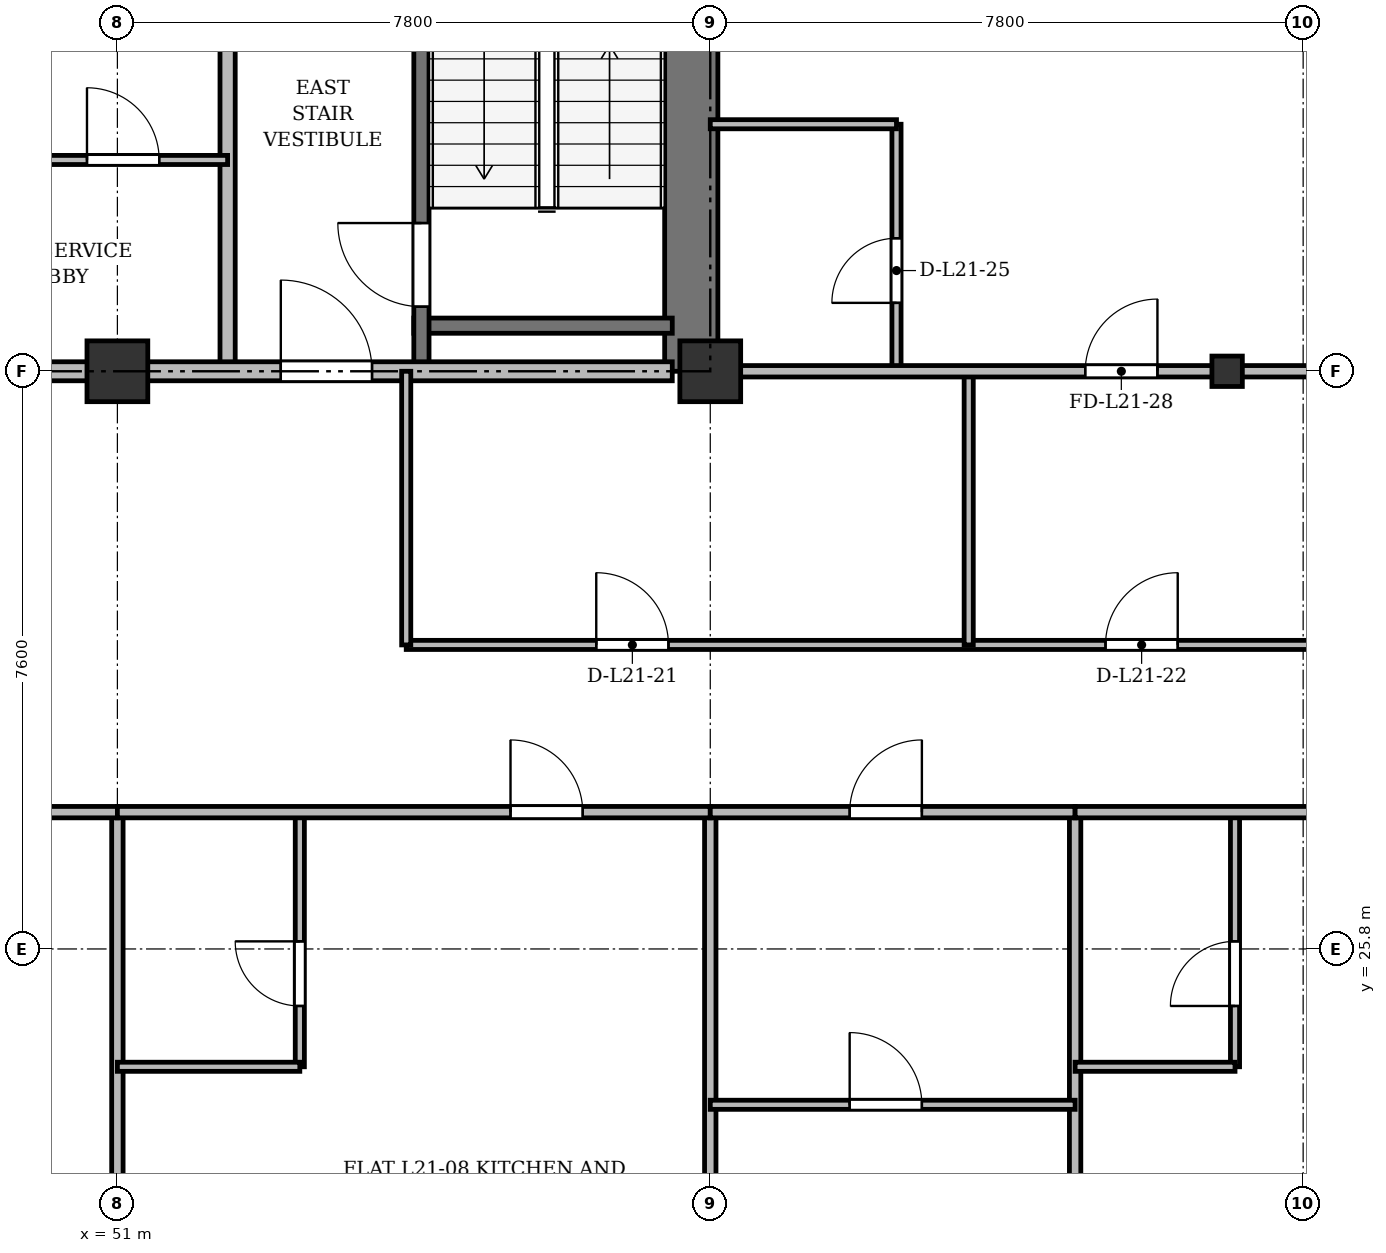
"""IFC4 building model, lengths in metres.
Left out: names, types, materials, properties, quantities, classifications, styles, units other than length and angle.
Written with IfcOpenShell. Run it as: python <this file> out.ifc"""

import sys

from ifc_helpers import new_model, si_unit, direction, frame, frame_2d, origin, origin_2d, place, context, subcontext, project, spatial, rectangle, i_section, extrude, source, transform, mapped, element, fill, save


model = new_model("IFC4")
c1 = context("Model", 3, precision=1e-05, world=origin(), true_north=direction((0.0, 1.0)))
c2 = subcontext(c1, "Body", "Model", "MODEL_VIEW")
j1 = project(units=[si_unit("LENGTHUNIT", "METRE"), si_unit("PLANEANGLEUNIT", "RADIAN")], contexts=[c1])
p1 = place(None, origin())
s1 = spatial("IfcSite", under=j1, at=p1, CompositionType="ELEMENT")
p2 = place(p1, origin())
s2 = spatial("IfcBuilding", under=s1, at=p2, CompositionType="ELEMENT")
p3 = place(p2, frame((0.0, 0.0, 85.3)))
s3 = spatial("IfcBuildingStorey", under=s2, at=p3, CompositionType="ELEMENT", Elevation=85.3)
m1 = source(origin(), c2, "Body", "SweptSolid", [
    extrude(rectangle(XDim=0.8, YDim=0.8, at=origin_2d()), origin(), (0.0, 0.0, 1.0), 3.6),
])
for number, where, z_axis, x_axis in (
    (1, (51.0, 33.4, 0.0), (0.0, 0.0, 1.0), (1.0, 0.0, 0.0)),
    (2, (58.8, 33.4, 0.0), (0.0, 0.0, 1.0), (1.0, 0.0, 0.0)),
):
    element("IfcColumn", number, at=place(p3, frame(where, z_axis=z_axis, x_axis=x_axis)), inside=s3, PredefinedType="COLUMN", context=c2, shape_type="MappedRepresentation", body=[
        mapped(m1, transform((0.0, 0.0, 0.0), x_axis=(1.0, 0.0, 0.0), y_axis=(0.0, 1.0, 0.0), z_axis=(0.0, 0.0, 1.0), scale=1.0)),
    ])
m2 = source(origin(), c2, "Body", "SweptSolid", [
    extrude(i_section(OverallWidth=0.4, OverallDepth=0.4, WebThickness=0.022, FlangeThickness=0.035, at=origin_2d()), origin(), (0.0, 0.0, 1.0), 3.6),
])
p4 = place(p3, frame((65.6, 33.4, 0.0), z_axis=(0.0, 0.0, 1.0), x_axis=(1.0, 0.0, 0.0)))
e3 = element("IfcColumn", 3, at=p4, inside=s3, PredefinedType="COLUMN", context=c2, shape_type="MappedRepresentation", body=[
    mapped(m2, transform((0.0, 0.0, 0.0), x_axis=(1.0, 0.0, 0.0), y_axis=(0.0, 1.0, 0.0), z_axis=(0.0, 0.0, 1.0), scale=1.0)),
])
p5 = place(p3, frame((58.55, 33.4, 0.0), z_axis=(0.0, 0.0, 1.0), x_axis=(0.0, 1.0, 0.0)))
e4 = element("IfcWall", 4, at=p5, inside=s3, PredefinedType="SHEAR", context=c2, shape_type="SweptSolid", body=[
    extrude(rectangle(XDim=11.7, YDim=0.7, at=frame_2d((5.85, 0.0))), origin(), (0.0, 0.0, 1.0), 3.34),
])
p6 = place(p3, frame((54.9, 34.0, 0.0), z_axis=(0.0, 0.0, 1.0), x_axis=(1.0, 0.0, 0.0)))
e5 = element("IfcWall", 5, at=p6, inside=s3, PredefinedType="SHEAR", context=c2, shape_type="SweptSolid", body=[
    extrude(rectangle(XDim=3.4, YDim=0.2, at=frame_2d((1.7, 0.0))), origin(), (0.0, 0.0, 1.0), 3.34),
])
p7 = place(p3, frame((55.0, 33.4, 0.0), z_axis=(0.0, 0.0, 1.0), x_axis=(0.0, 1.0, 0.0)))
e6 = element("IfcWall", 6, at=p7, inside=s3, PredefinedType="SHEAR", context=c2, shape_type="SweptSolid", body=[
    extrude(rectangle(XDim=11.1, YDim=0.2, at=frame_2d((5.55, 0.0))), origin(), (0.0, 0.0, 1.0), 3.34),
])
p8 = place(p7, frame((0.85, 0.0, 0.0)))
e7 = element("IfcOpeningElement", 7, at=p8, cuts=e6, PredefinedType="OPENING", context=c2, shape_type="SweptSolid", body=[
    extrude(rectangle(XDim=1.1, YDim=2.15, at=frame_2d((0.55, 1.075))), frame((0.0, 0.11, 0.0), z_axis=(0.0, -1.0, 0.0), x_axis=(1.0, 0.0, 0.0)), (0.0, 0.0, 1.0), 0.22),
])
p9 = place(p3, frame((52.45, 33.4, 0.0), z_axis=(0.0, 0.0, 1.0), x_axis=(0.0, 1.0, 0.0)))
e8 = element("IfcWall", 8, at=p9, inside=s3, PredefinedType="PARTITIONING", context=c2, shape_type="SweptSolid", body=[
    extrude(rectangle(XDim=8.65, YDim=0.2, at=frame_2d((4.325, 0.0))), origin(), (0.0, 0.0, 1.0), 2.752),
])
p10 = place(p9, frame((6.2, 0.0, 0.0)))
e9 = element("IfcOpeningElement", 9, at=p10, cuts=e8, PredefinedType="OPENING", context=c2, shape_type="SweptSolid", body=[
    extrude(rectangle(XDim=0.95, YDim=2.15, at=frame_2d((0.475, 1.075))), frame((0.0, 0.11, 0.0), z_axis=(0.0, -1.0, 0.0), x_axis=(1.0, 0.0, 0.0)), (0.0, 0.0, 1.0), 0.22),
])
p11 = place(p3, frame((47.15, 36.18, 0.0), z_axis=(0.0, 0.0, 1.0), x_axis=(1.0, 0.0, 0.0)))
e10 = element("IfcWall", 10, at=p11, inside=s3, PredefinedType="PARTITIONING", context=c2, shape_type="SweptSolid", body=[
    extrude(rectangle(XDim=5.3, YDim=0.12, at=frame_2d((2.65, 0.0))), origin(), (0.0, 0.0, 1.0), 2.84),
])
p12 = place(p11, frame((0.75, 0.0, 0.0)))
e11 = element("IfcOpeningElement", 11, at=p12, cuts=e10, PredefinedType="OPENING", context=c2, shape_type="SweptSolid", body=[
    extrude(rectangle(XDim=0.95, YDim=2.15, at=frame_2d((0.475, 1.075))), frame((0.0, 0.07, 0.0), z_axis=(0.0, -1.0, 0.0), x_axis=(1.0, 0.0, 0.0)), (0.0, 0.0, 1.0), 0.14),
])
p13 = place(p11, frame((3.45, 0.0, 0.0)))
e12 = element("IfcOpeningElement", 12, at=p13, cuts=e10, PredefinedType="OPENING", context=c2, shape_type="SweptSolid", body=[
    extrude(rectangle(XDim=0.95, YDim=2.15, at=frame_2d((0.475, 1.075))), frame((0.0, 0.07, 0.0), z_axis=(0.0, -1.0, 0.0), x_axis=(1.0, 0.0, 0.0)), (0.0, 0.0, 1.0), 0.14),
])
p14 = place(p3, frame((47.15, 33.4, 0.0), z_axis=(0.0, 0.0, 1.0), x_axis=(1.0, 0.0, 0.0)))
e13 = element("IfcWall", 13, at=p14, inside=s3, PredefinedType="PARTITIONING", context=c2, shape_type="SweptSolid", body=[
    extrude(rectangle(XDim=11.15, YDim=0.25, at=frame_2d((5.575, 0.0))), origin(), (0.0, 0.0, 1.0), 2.752),
])
p15 = place(p14, frame((0.7, 0.0, 0.0)))
e14 = element("IfcOpeningElement", 14, at=p15, cuts=e13, PredefinedType="OPENING", context=c2, shape_type="SweptSolid", body=[
    extrude(rectangle(XDim=0.95, YDim=2.15, at=frame_2d((0.475, 1.075))), frame((0.0, 0.135, 0.0), z_axis=(0.0, -1.0, 0.0), x_axis=(1.0, 0.0, 0.0)), (0.0, 0.0, 1.0), 0.27),
])
p16 = place(p14, frame((6.0, 0.0, 0.0)))
e15 = element("IfcOpeningElement", 15, at=p16, cuts=e13, PredefinedType="OPENING", context=c2, shape_type="SweptSolid", body=[
    extrude(rectangle(XDim=1.2, YDim=2.15, at=frame_2d((0.6, 1.075))), frame((0.0, 0.135, 0.0), z_axis=(0.0, -1.0, 0.0), x_axis=(1.0, 0.0, 0.0)), (0.0, 0.0, 1.0), 0.27),
])
p17 = place(p3, frame((54.8, 29.8, 0.0), z_axis=(0.0, 0.0, 1.0), x_axis=(1.0, 0.0, 0.0)))
e16 = element("IfcWall", 16, at=p17, inside=s3, PredefinedType="PARTITIONING", context=c2, shape_type="SweptSolid", body=[
    extrude(rectangle(XDim=14.85, YDim=0.12, at=frame_2d((7.425, 0.0))), origin(), (0.0, 0.0, 1.0), 2.84),
])
p18 = place(p17, frame((2.5, 0.0, 0.0)))
e17 = element("IfcOpeningElement", 17, at=p18, cuts=e16, PredefinedType="OPENING", context=c2, shape_type="SweptSolid", body=[
    extrude(rectangle(XDim=0.95, YDim=2.15, at=frame_2d((0.475, 1.075))), frame((0.0, 0.07, 0.0), z_axis=(0.0, -1.0, 0.0), x_axis=(1.0, 0.0, 0.0)), (0.0, 0.0, 1.0), 0.14),
])
p19 = place(p17, frame((9.2, 0.0, 0.0)))
e18 = element("IfcOpeningElement", 18, at=p19, cuts=e16, PredefinedType="OPENING", context=c2, shape_type="SweptSolid", body=[
    extrude(rectangle(XDim=0.95, YDim=2.15, at=frame_2d((0.475, 1.075))), frame((0.0, 0.07, 0.0), z_axis=(0.0, -1.0, 0.0), x_axis=(1.0, 0.0, 0.0)), (0.0, 0.0, 1.0), 0.14),
])
for number, where, z_axis, x_axis in (
    (19, (62.2, 29.8, 0.0), (0.0, 0.0, 1.0), (0.0, 1.0, 0.0)),
    (20, (54.8, 29.8, 0.0), (0.0, 0.0, 1.0), (0.0, 1.0, 0.0)),
):
    element("IfcWall", number, at=place(p3, frame(where, z_axis=z_axis, x_axis=x_axis)), inside=s3, PredefinedType="PARTITIONING", context=c2, shape_type="SweptSolid", body=[
        extrude(rectangle(XDim=3.6, YDim=0.12, at=frame_2d((1.8, 0.0))), origin(), (0.0, 0.0, 1.0), 2.752),
    ])
p20 = place(p3, frame((61.25, 33.4, 0.0), z_axis=(0.0, 0.0, 1.0), x_axis=(0.0, 1.0, 0.0)))
e21 = element("IfcWall", 21, at=p20, inside=s3, PredefinedType="PARTITIONING", context=c2, shape_type="SweptSolid", body=[
    extrude(rectangle(XDim=3.25, YDim=0.12, at=frame_2d((1.625, 0.0))), origin(), (0.0, 0.0, 1.0), 2.752),
])
p21 = place(p20, frame((0.9, 0.0, 0.0)))
e22 = element("IfcOpeningElement", 22, at=p21, cuts=e21, PredefinedType="OPENING", context=c2, shape_type="SweptSolid", body=[
    extrude(rectangle(XDim=0.85, YDim=2.1, at=frame_2d((0.425, 1.05))), frame((0.0, 0.07, 0.0), z_axis=(0.0, -1.0, 0.0), x_axis=(1.0, 0.0, 0.0)), (0.0, 0.0, 1.0), 0.14),
])
p22 = place(p3, frame((58.8, 36.65, 0.0), z_axis=(0.0, 0.0, 1.0), x_axis=(1.0, 0.0, 0.0)))
e23 = element("IfcWall", 23, at=p22, inside=s3, PredefinedType="PARTITIONING", context=c2, shape_type="SweptSolid", body=[
    extrude(rectangle(XDim=2.45, YDim=0.12, at=frame_2d((1.225, 0.0))), origin(), (0.0, 0.0, 1.0), 2.84),
])
p23 = place(p3, frame((58.8, 33.4, 0.0), z_axis=(0.0, 0.0, 1.0), x_axis=(1.0, 0.0, 0.0)))
e24 = element("IfcWall", 24, at=p23, inside=s3, PredefinedType="PARTITIONING", context=c2, shape_type="SweptSolid", body=[
    extrude(rectangle(XDim=10.85, YDim=0.15, at=frame_2d((5.425, 0.0))), origin(), (0.0, 0.0, 1.0), 2.752),
])
p24 = place(p23, frame((4.933, 0.0, 0.0)))
e25 = element("IfcOpeningElement", 25, at=p24, cuts=e24, PredefinedType="OPENING", context=c2, shape_type="SweptSolid", body=[
    extrude(rectangle(XDim=0.95, YDim=2.15, at=frame_2d((0.475, 1.075))), frame((0.0, 0.085, 0.0), z_axis=(0.0, -1.0, 0.0), x_axis=(1.0, 0.0, 0.0)), (0.0, 0.0, 1.0), 0.17),
])
for number, where, z_axis, x_axis in (
    (26, (51.0, 3.145, 0.0), (0.0, 0.0, 1.0), (0.0, 1.0, 0.0)),
    (27, (58.8, 3.145, 0.0), (0.0, 0.0, 1.0), (0.0, 1.0, 0.0)),
):
    element("IfcWall", number, at=place(p3, frame(where, z_axis=z_axis, x_axis=x_axis)), inside=s3, PredefinedType="PARTITIONING", context=c2, shape_type="SweptSolid", body=[
        extrude(rectangle(XDim=24.455, YDim=0.15, at=frame_2d((12.228, 0.0))), origin(), (0.0, 0.0, 1.0), 2.84),
    ])
p25 = place(p3, frame((63.6, 3.145, 0.0), z_axis=(0.0, 0.0, 1.0), x_axis=(0.0, 1.0, 0.0)))
e28 = element("IfcWall", 28, at=p25, inside=s3, PredefinedType="PARTITIONING", context=c2, shape_type="SweptSolid", body=[
    extrude(rectangle(XDim=24.455, YDim=0.15, at=frame_2d((12.228, 0.0))), origin(), (0.0, 0.0, 1.0), 2.752),
])
p26 = place(p3, frame((43.8, 27.6, 0.0), z_axis=(0.0, 0.0, 1.0), x_axis=(1.0, 0.0, 0.0)))
e29 = element("IfcWall", 29, at=p26, inside=s3, PredefinedType="PARTITIONING", context=c2, shape_type="SweptSolid", body=[
    extrude(rectangle(XDim=7.2, YDim=0.15, at=frame_2d((3.6, 0.0))), origin(), (0.0, 0.0, 1.0), 2.84),
])
p27 = place(p26, frame((4.706, 0.0, 0.0)))
e30 = element("IfcOpeningElement", 30, at=p27, cuts=e29, PredefinedType="OPENING", context=c2, shape_type="SweptSolid", body=[
    extrude(rectangle(XDim=0.95, YDim=2.15, at=frame_2d((0.475, 1.075))), frame((0.0, 0.085, 0.0), z_axis=(0.0, -1.0, 0.0), x_axis=(1.0, 0.0, 0.0)), (0.0, 0.0, 1.0), 0.17),
])
p28 = place(p3, frame((53.4, 24.25, 0.0), z_axis=(0.0, 0.0, 1.0), x_axis=(0.0, 1.0, 0.0)))
e31 = element("IfcWall", 31, at=p28, inside=s3, PredefinedType="PARTITIONING", context=c2, shape_type="SweptSolid", body=[
    extrude(rectangle(XDim=3.35, YDim=0.12, at=frame_2d((1.675, 0.0))), origin(), (0.0, 0.0, 1.0), 2.99),
])
p29 = place(p28, frame((0.8, 0.0, 0.0)))
e32 = element("IfcOpeningElement", 32, at=p29, cuts=e31, PredefinedType="OPENING", context=c2, shape_type="SweptSolid", body=[
    extrude(rectangle(XDim=0.85, YDim=2.1, at=frame_2d((0.425, 1.05))), frame((0.0, 0.07, 0.0), z_axis=(0.0, -1.0, 0.0), x_axis=(1.0, 0.0, 0.0)), (0.0, 0.0, 1.0), 0.14),
])
p30 = place(p3, frame((51.0, 24.25, 0.0), z_axis=(0.0, 0.0, 1.0), x_axis=(1.0, 0.0, 0.0)))
e33 = element("IfcWall", 33, at=p30, inside=s3, PredefinedType="PARTITIONING", context=c2, shape_type="SweptSolid", body=[
    extrude(rectangle(XDim=2.4, YDim=0.12, at=frame_2d((1.2, 0.0))), origin(), (0.0, 0.0, 1.0), 2.84),
])
p31 = place(p3, frame((51.0, 27.6, 0.0), z_axis=(0.0, 0.0, 1.0), x_axis=(1.0, 0.0, 0.0)))
e34 = element("IfcWall", 34, at=p31, inside=s3, PredefinedType="PARTITIONING", context=c2, shape_type="SweptSolid", body=[
    extrude(rectangle(XDim=7.8, YDim=0.15, at=frame_2d((3.9, 0.0))), origin(), (0.0, 0.0, 1.0), 2.84),
])
p32 = place(p31, frame((5.172, 0.0, 0.0)))
e35 = element("IfcOpeningElement", 35, at=p32, cuts=e34, PredefinedType="OPENING", context=c2, shape_type="SweptSolid", body=[
    extrude(rectangle(XDim=0.95, YDim=2.15, at=frame_2d((0.475, 1.075))), frame((0.0, 0.085, 0.0), z_axis=(0.0, -1.0, 0.0), x_axis=(1.0, 0.0, 0.0)), (0.0, 0.0, 1.0), 0.17),
])
p33 = place(p3, frame((58.8, 27.6, 0.0), z_axis=(0.0, 0.0, 1.0), x_axis=(1.0, 0.0, 0.0)))
e36 = element("IfcWall", 36, at=p33, inside=s3, PredefinedType="PARTITIONING", context=c2, shape_type="SweptSolid", body=[
    extrude(rectangle(XDim=4.8, YDim=0.15, at=frame_2d((2.4, 0.0))), origin(), (0.0, 0.0, 1.0), 2.84),
])
p34 = place(p33, frame((1.834, 0.0, 0.0)))
e37 = element("IfcOpeningElement", 37, at=p34, cuts=e36, PredefinedType="OPENING", context=c2, shape_type="SweptSolid", body=[
    extrude(rectangle(XDim=0.95, YDim=2.15, at=frame_2d((0.475, 1.075))), frame((0.0, 0.085, 0.0), z_axis=(0.0, -1.0, 0.0), x_axis=(1.0, 0.0, 0.0)), (0.0, 0.0, 1.0), 0.17),
])
p35 = place(p3, frame((58.8, 23.75, 0.0), z_axis=(0.0, 0.0, 1.0), x_axis=(1.0, 0.0, 0.0)))
e38 = element("IfcWall", 38, at=p35, inside=s3, PredefinedType="PARTITIONING", context=c2, shape_type="SweptSolid", body=[
    extrude(rectangle(XDim=4.8, YDim=0.12, at=frame_2d((2.4, 0.0))), origin(), (0.0, 0.0, 1.0), 2.84),
])
p36 = place(p35, frame((1.834, 0.0, 0.0)))
e39 = element("IfcOpeningElement", 39, at=p36, cuts=e38, PredefinedType="OPENING", context=c2, shape_type="SweptSolid", body=[
    extrude(rectangle(XDim=0.95, YDim=2.15, at=frame_2d((0.475, 1.075))), frame((0.0, 0.07, 0.0), z_axis=(0.0, -1.0, 0.0), x_axis=(1.0, 0.0, 0.0)), (0.0, 0.0, 1.0), 0.14),
])
p37 = place(p3, frame((65.704, 24.25, 0.0), z_axis=(0.0, 0.0, 1.0), x_axis=(0.0, 1.0, 0.0)))
e40 = element("IfcWall", 40, at=p37, inside=s3, PredefinedType="PARTITIONING", context=c2, shape_type="SweptSolid", body=[
    extrude(rectangle(XDim=3.35, YDim=0.12, at=frame_2d((1.675, 0.0))), origin(), (0.0, 0.0, 1.0), 2.84),
])
p38 = place(p37, frame((0.8, 0.0, 0.0)))
e41 = element("IfcOpeningElement", 41, at=p38, cuts=e40, PredefinedType="OPENING", context=c2, shape_type="SweptSolid", body=[
    extrude(rectangle(XDim=0.85, YDim=2.1, at=frame_2d((0.425, 1.05))), frame((0.0, 0.07, 0.0), z_axis=(0.0, -1.0, 0.0), x_axis=(1.0, 0.0, 0.0)), (0.0, 0.0, 1.0), 0.14),
])
p39 = place(p3, frame((63.6, 24.25, 0.0), z_axis=(0.0, 0.0, 1.0), x_axis=(1.0, 0.0, 0.0)))
e42 = element("IfcWall", 42, at=p39, inside=s3, PredefinedType="PARTITIONING", context=c2, shape_type="SweptSolid", body=[
    extrude(rectangle(XDim=2.104, YDim=0.12, at=frame_2d((1.052, 0.0))), origin(), (0.0, 0.0, 1.0), 2.84),
])
p40 = place(p3, frame((63.6, 27.6, 0.0), z_axis=(0.0, 0.0, 1.0), x_axis=(1.0, 0.0, 0.0)))
e43 = element("IfcWall", 43, at=p40, inside=s3, PredefinedType="PARTITIONING", context=c2, shape_type="SweptSolid", body=[
    extrude(rectangle(XDim=6.055, YDim=0.15, at=frame_2d((3.027, 0.0))), origin(), (0.0, 0.0, 1.0), 2.84),
])
p41 = place(p40, frame((3.961, 0.0, 0.0)))
e44 = element("IfcOpeningElement", 44, at=p41, cuts=e43, PredefinedType="OPENING", context=c2, shape_type="SweptSolid", body=[
    extrude(rectangle(XDim=0.95, YDim=2.15, at=frame_2d((0.475, 1.075))), frame((0.0, 0.085, 0.0), z_axis=(0.0, -1.0, 0.0), x_axis=(1.0, 0.0, 0.0)), (0.0, 0.0, 1.0), 0.17),
])
m3 = source(origin(), c2, "Body", "SweptSolid", [
    extrude(rectangle(XDim=1.1, YDim=2.15, at=frame_2d((0.55, 1.075))), frame((0.0, 0.025, 0.0), z_axis=(0.0, -1.0, 0.0), x_axis=(1.0, 0.0, 0.0)), (0.0, 0.0, 1.0), 0.05),
])
p42 = place(p8, origin())
e45 = element("IfcDoor", 45, at=p42, inside=s3, OperationType="SINGLE_SWING_RIGHT", PredefinedType="DOOR", context=c2, shape_type="MappedRepresentation", body=[
    mapped(m3, transform((0.0, 0.0, 0.0), x_axis=(1.0, 0.0, 0.0), y_axis=(0.0, 1.0, 0.0), z_axis=(0.0, 0.0, 1.0), scale=1.0)),
])
fill(e7, e45)
m4 = source(origin(), c2, "Body", "SweptSolid", [
    extrude(rectangle(XDim=0.95, YDim=2.15, at=frame_2d((0.475, 1.075))), frame((0.0, 0.025, 0.0), z_axis=(0.0, -1.0, 0.0), x_axis=(1.0, 0.0, 0.0)), (0.0, 0.0, 1.0), 0.05),
])
p43 = place(p13, origin())
e46 = element("IfcDoor", 46, at=p43, inside=s3, OperationType="SINGLE_SWING_LEFT", PredefinedType="DOOR", context=c2, shape_type="MappedRepresentation", body=[
    mapped(m4, transform((0.0, 0.0, 0.0), x_axis=(1.0, 0.0, 0.0), y_axis=(0.0, 1.0, 0.0), z_axis=(0.0, 0.0, 1.0), scale=1.0)),
])
fill(e12, e46)
m5 = source(origin(), c2, "Body", "SweptSolid", [
    extrude(rectangle(XDim=1.2, YDim=2.15, at=frame_2d((0.6, 1.075))), frame((0.0, 0.025, 0.0), z_axis=(0.0, -1.0, 0.0), x_axis=(1.0, 0.0, 0.0)), (0.0, 0.0, 1.0), 0.05),
])
p44 = place(p16, origin())
e47 = element("IfcDoor", 47, at=p44, inside=s3, OperationType="SINGLE_SWING_LEFT", PredefinedType="DOOR", context=c2, shape_type="MappedRepresentation", body=[
    mapped(m5, transform((0.0, 0.0, 0.0), x_axis=(1.0, 0.0, 0.0), y_axis=(0.0, 1.0, 0.0), z_axis=(0.0, 0.0, 1.0), scale=1.0)),
])
fill(e15, e47)
p45 = place(p18, origin())
e48 = element("IfcDoor", 48, at=p45, inside=s3, OperationType="SINGLE_SWING_LEFT", PredefinedType="DOOR", context=c2, shape_type="MappedRepresentation", body=[
    mapped(m4, transform((0.0, 0.0, 0.0), x_axis=(1.0, 0.0, 0.0), y_axis=(0.0, 1.0, 0.0), z_axis=(0.0, 0.0, 1.0), scale=1.0)),
])
fill(e17, e48)
p46 = place(p19, origin())
e49 = element("IfcDoor", 49, at=p46, inside=s3, OperationType="SINGLE_SWING_RIGHT", PredefinedType="DOOR", context=c2, shape_type="MappedRepresentation", body=[
    mapped(m4, transform((0.0, 0.0, 0.0), x_axis=(1.0, 0.0, 0.0), y_axis=(0.0, 1.0, 0.0), z_axis=(0.0, 0.0, 1.0), scale=1.0)),
])
fill(e18, e49)
m6 = source(origin(), c2, "Body", "SweptSolid", [
    extrude(rectangle(XDim=0.85, YDim=2.1, at=frame_2d((0.425, 1.05))), frame((0.0, 0.025, 0.0), z_axis=(0.0, -1.0, 0.0), x_axis=(1.0, 0.0, 0.0)), (0.0, 0.0, 1.0), 0.05),
])
p47 = place(p21, origin())
e50 = element("IfcDoor", 50, at=p47, inside=s3, OperationType="SINGLE_SWING_LEFT", PredefinedType="DOOR", context=c2, shape_type="MappedRepresentation", body=[
    mapped(m6, transform((0.0, 0.0, 0.0), x_axis=(1.0, 0.0, 0.0), y_axis=(0.0, 1.0, 0.0), z_axis=(0.0, 0.0, 1.0), scale=1.0)),
])
fill(e22, e50)
p48 = place(p24, origin())
e51 = element("IfcDoor", 51, at=p48, inside=s3, OperationType="SINGLE_SWING_RIGHT", PredefinedType="DOOR", context=c2, shape_type="MappedRepresentation", body=[
    mapped(m4, transform((0.0, 0.0, 0.0), x_axis=(1.0, 0.0, 0.0), y_axis=(0.0, 1.0, 0.0), z_axis=(0.0, 0.0, 1.0), scale=1.0)),
])
fill(e25, e51)
p49 = place(p29, origin())
e52 = element("IfcDoor", 52, at=p49, inside=s3, OperationType="SINGLE_SWING_RIGHT", PredefinedType="DOOR", context=c2, shape_type="MappedRepresentation", body=[
    mapped(m6, transform((0.0, 0.0, 0.0), x_axis=(1.0, 0.0, 0.0), y_axis=(0.0, 1.0, 0.0), z_axis=(0.0, 0.0, 1.0), scale=1.0)),
])
fill(e32, e52)
p50 = place(p32, origin())
e53 = element("IfcDoor", 53, at=p50, inside=s3, OperationType="SINGLE_SWING_LEFT", PredefinedType="DOOR", context=c2, shape_type="MappedRepresentation", body=[
    mapped(m4, transform((0.0, 0.0, 0.0), x_axis=(1.0, 0.0, 0.0), y_axis=(0.0, 1.0, 0.0), z_axis=(0.0, 0.0, 1.0), scale=1.0)),
])
fill(e35, e53)
p51 = place(p34, origin())
e54 = element("IfcDoor", 54, at=p51, inside=s3, OperationType="SINGLE_SWING_RIGHT", PredefinedType="DOOR", context=c2, shape_type="MappedRepresentation", body=[
    mapped(m4, transform((0.0, 0.0, 0.0), x_axis=(1.0, 0.0, 0.0), y_axis=(0.0, 1.0, 0.0), z_axis=(0.0, 0.0, 1.0), scale=1.0)),
])
fill(e37, e54)
p52 = place(p36, origin())
e55 = element("IfcDoor", 55, at=p52, inside=s3, OperationType="SINGLE_SWING_LEFT", PredefinedType="DOOR", context=c2, shape_type="MappedRepresentation", body=[
    mapped(m4, transform((0.0, 0.0, 0.0), x_axis=(1.0, 0.0, 0.0), y_axis=(0.0, 1.0, 0.0), z_axis=(0.0, 0.0, 1.0), scale=1.0)),
])
fill(e39, e55)
p53 = place(p38, origin())
e56 = element("IfcDoor", 56, at=p53, inside=s3, OperationType="SINGLE_SWING_LEFT", PredefinedType="DOOR", context=c2, shape_type="MappedRepresentation", body=[
    mapped(m6, transform((0.0, 0.0, 0.0), x_axis=(1.0, 0.0, 0.0), y_axis=(0.0, 1.0, 0.0), z_axis=(0.0, 0.0, 1.0), scale=1.0)),
])
fill(e41, e56)
save(model, sys.argv[1])
